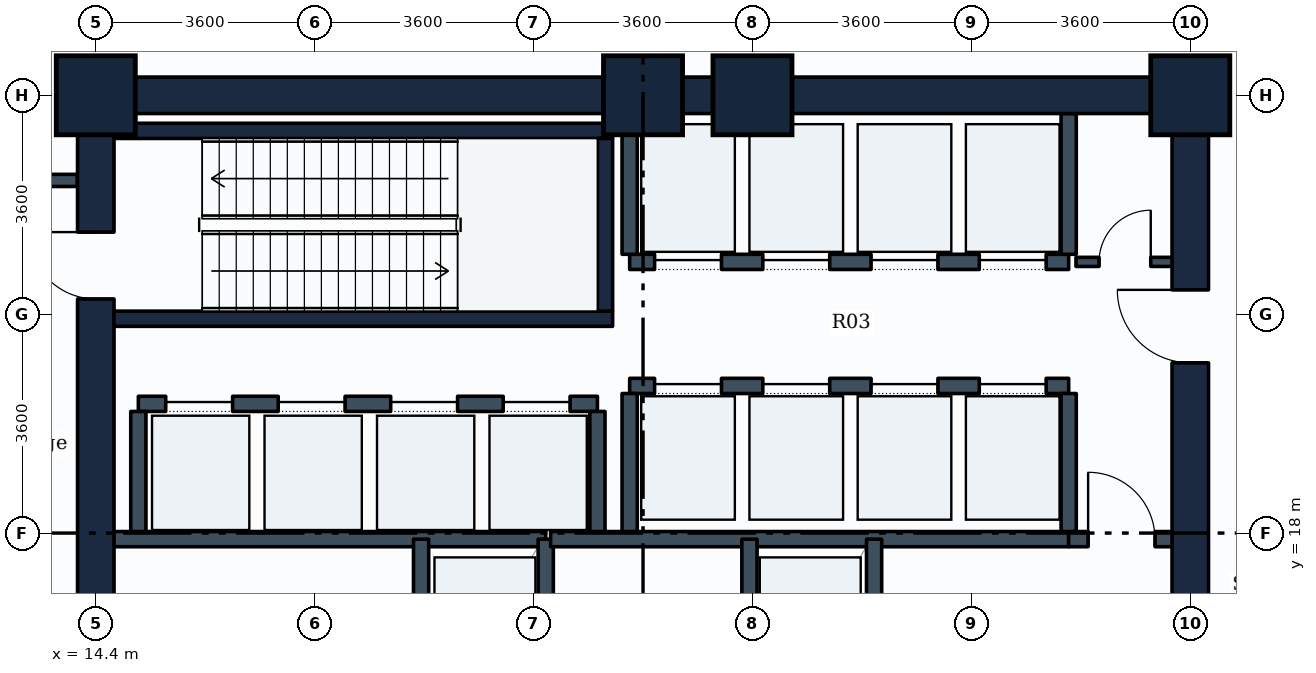
"""IFC4 building model, lengths in metres.
Left out: names, types, materials, properties, quantities, classifications, styles, units other than length and angle.
Written with IfcOpenShell. Run it as: python <this file> out.ifc"""

import sys

from ifc_helpers import new_model, si_unit, direction, frame, frame_2d, origin, origin_2d, place, context, subcontext, project, spatial, rectangle, extrude, element, fill, save


model = new_model("IFC4")
c1 = context("Model", 3, precision=1e-05, world=origin(), true_north=direction((0.0, 1.0)))
c2 = subcontext(c1, "Body", "Model", "MODEL_VIEW")
j1 = project(units=[si_unit("LENGTHUNIT", "METRE"), si_unit("PLANEANGLEUNIT", "RADIAN")], contexts=[c1])
p1 = place(None, origin())
s1 = spatial("IfcSite", under=j1, at=p1, CompositionType="ELEMENT")
p2 = place(p1, origin())
s2 = spatial("IfcBuilding", under=s1, at=p2, CompositionType="ELEMENT")
p3 = place(p2, origin())
s3 = spatial("IfcBuildingStorey", under=s2, at=p3, CompositionType="ELEMENT", Elevation=0.0)
for number, where, z_axis, x_axis in (
    (1, (14.4, 25.2, 0.0), (0.0, 0.0, 1.0), (1.0, 0.0, 0.0)),
    (2, (23.4, 25.2, 0.0), (0.0, 0.0, 1.0), (1.0, 0.0, 0.0)),
    (3, (25.2, 25.2, 0.0), (0.0, 0.0, 1.0), (1.0, 0.0, 0.0)),
    (4, (32.4, 25.2, 0.0), (0.0, 0.0, 1.0), (1.0, 0.0, 0.0)),
):
    element("IfcColumn", number, at=place(p3, frame(where, z_axis=z_axis, x_axis=x_axis)), inside=s3, PredefinedType="COLUMN", context=c2, shape_type="SweptSolid", body=[
        extrude(rectangle(XDim=1.3, YDim=1.3, at=origin_2d()), origin(), (0.0, 0.0, 1.0), 5.4),
    ])
p4 = place(p3, frame((14.4, 25.2, 0.0), z_axis=(0.0, 0.0, 1.0), x_axis=(1.0, 0.0, 0.0)))
e5 = element("IfcWall", 5, at=p4, inside=s3, PredefinedType="SHEAR", context=c2, shape_type="SweptSolid", body=[
    extrude(rectangle(XDim=18.0, YDim=0.6, at=frame_2d((9.0, 0.0))), origin(), (0.0, 0.0, 1.0), 5.1),
])
p5 = place(p3, frame((14.4, 10.8, 0.0), z_axis=(0.0, 0.0, 1.0), x_axis=(0.0, 1.0, 0.0)))
e6 = element("IfcWall", 6, at=p5, inside=s3, PredefinedType="SHEAR", context=c2, shape_type="SweptSolid", body=[
    extrude(rectangle(XDim=14.4, YDim=0.6, at=frame_2d((7.2, 0.0))), origin(), (0.0, 0.0, 1.0), 5.1),
])
p6 = place(p5, frame((11.05, 0.0, 0.0)))
e7 = element("IfcOpeningElement", 7, at=p6, cuts=e6, PredefinedType="OPENING", context=c2, shape_type="SweptSolid", body=[
    extrude(rectangle(XDim=1.1, YDim=2.1, at=frame_2d((0.55, 1.05))), frame((0.0, 0.31, 0.0), z_axis=(0.0, -1.0, 0.0), x_axis=(1.0, 0.0, 0.0)), (0.0, 0.0, 1.0), 0.62),
])
p7 = place(p5, frame((4.9, 0.0, 0.0)))
e8 = element("IfcOpeningElement", 8, at=p7, cuts=e6, PredefinedType="OPENING", context=c2, shape_type="SweptSolid", body=[
    extrude(rectangle(XDim=1.2, YDim=2.1, at=frame_2d((0.6, 1.05))), frame((0.0, 0.31, 0.0), z_axis=(0.0, -1.0, 0.0), x_axis=(1.0, 0.0, 0.0)), (0.0, 0.0, 1.0), 0.62),
])
p8 = place(p3, frame((32.4, 10.8, 0.0), z_axis=(0.0, 0.0, 1.0), x_axis=(0.0, 1.0, 0.0)))
e9 = element("IfcWall", 9, at=p8, inside=s3, PredefinedType="SHEAR", context=c2, shape_type="SweptSolid", body=[
    extrude(rectangle(XDim=14.4, YDim=0.6, at=frame_2d((7.2, 0.0))), origin(), (0.0, 0.0, 1.0), 5.1),
])
p9 = place(p8, frame((4.35, 0.0, 0.0)))
e10 = element("IfcOpeningElement", 10, at=p9, cuts=e9, PredefinedType="OPENING", context=c2, shape_type="SweptSolid", body=[
    extrude(rectangle(XDim=1.2, YDim=2.1, at=frame_2d((0.6, 1.05))), frame((0.0, 0.31, 0.0), z_axis=(0.0, -1.0, 0.0), x_axis=(1.0, 0.0, 0.0)), (0.0, 0.0, 1.0), 0.62),
])
p10 = place(p8, frame((10.0, 0.0, 0.0)))
e11 = element("IfcOpeningElement", 11, at=p10, cuts=e9, PredefinedType="OPENING", context=c2, shape_type="SweptSolid", body=[
    extrude(rectangle(XDim=1.2, YDim=2.1, at=frame_2d((0.6, 1.05))), frame((0.0, 0.31, 0.0), z_axis=(0.0, -1.0, 0.0), x_axis=(1.0, 0.0, 0.0)), (0.0, 0.0, 1.0), 0.62),
])
for number, where, z_axis, x_axis in (
    (12, (14.7, 21.525, 0.0), (0.0, 0.0, 1.0), (1.0, 0.0, 0.0)),
    (13, (14.7, 24.615, 0.0), (0.0, 0.0, 1.0), (1.0, 0.0, 0.0)),
):
    element("IfcWall", number, at=place(p3, frame(where, z_axis=z_axis, x_axis=x_axis)), inside=s3, PredefinedType="SHEAR", context=c2, shape_type="SweptSolid", body=[
        extrude(rectangle(XDim=8.2, YDim=0.25, at=frame_2d((4.1, 0.0))), origin(), (0.0, 0.0, 1.0), 5.1),
    ])
p11 = place(p3, frame((22.775, 21.65, 0.0), z_axis=(0.0, 0.0, 1.0), x_axis=(0.0, 1.0, 0.0)))
e14 = element("IfcWall", 14, at=p11, inside=s3, PredefinedType="SHEAR", context=c2, shape_type="SweptSolid", body=[
    extrude(rectangle(XDim=2.84, YDim=0.25, at=frame_2d((1.42, 0.0))), origin(), (0.0, 0.0, 1.0), 5.1),
])
p12 = place(p3, frame((14.65, 17.9, 0.0), z_axis=(0.0, 0.0, 1.0), x_axis=(1.0, 0.0, 0.0)))
e15 = element("IfcWall", 15, at=p12, inside=s3, PredefinedType="PARTITIONING", context=c2, shape_type="SweptSolid", body=[
    extrude(rectangle(XDim=7.15, YDim=0.25, at=frame_2d((3.575, 0.0))), origin(), (0.0, 0.0, 1.0), 5.085),
])
p13 = place(p3, frame((19.75, 14.84, 0.0), z_axis=(0.0, 0.0, 1.0), x_axis=(0.0, 1.0, 0.0)))
e16 = element("IfcWall", 16, at=p13, inside=s3, PredefinedType="PARTITIONING", context=c2, shape_type="SweptSolid", body=[
    extrude(rectangle(XDim=3.06, YDim=0.25, at=frame_2d((1.53, 0.0))), origin(), (0.0, 0.0, 1.0), 5.085),
])
p14 = place(p13, frame((0.98, 0.0, 0.0)))
e17 = element("IfcOpeningElement", 17, at=p14, cuts=e16, PredefinedType="OPENING", context=c2, shape_type="SweptSolid", body=[
    extrude(rectangle(XDim=1.1, YDim=2.1, at=frame_2d((0.55, 1.05))), frame((0.0, 0.135, 0.0), z_axis=(0.0, -1.0, 0.0), x_axis=(1.0, 0.0, 0.0)), (0.0, 0.0, 1.0), 0.27),
])
p15 = place(p3, frame((21.8, 14.84, 0.0), z_axis=(0.0, 0.0, 1.0), x_axis=(0.0, 1.0, 0.0)))
e18 = element("IfcWall", 18, at=p15, inside=s3, PredefinedType="PARTITIONING", context=c2, shape_type="SweptSolid", body=[
    extrude(rectangle(XDim=3.06, YDim=0.25, at=frame_2d((1.53, 0.0))), origin(), (0.0, 0.0, 1.0), 5.085),
])
p16 = place(p3, frame((21.88, 17.9, 0.0), z_axis=(0.0, 0.0, 1.0), x_axis=(1.0, 0.0, 0.0)))
e19 = element("IfcWall", 19, at=p16, inside=s3, PredefinedType="PARTITIONING", context=c2, shape_type="SweptSolid", body=[
    extrude(rectangle(XDim=8.52, YDim=0.25, at=frame_2d((4.26, 0.0))), origin(), (0.0, 0.0, 1.0), 5.085),
])
p17 = place(p3, frame((30.4, 17.9, 0.0), z_axis=(0.0, 0.0, 1.0), x_axis=(1.0, 0.0, 0.0)))
e20 = element("IfcWall", 20, at=p17, inside=s3, PredefinedType="PARTITIONING", context=c2, shape_type="SweptSolid", body=[
    extrude(rectangle(XDim=1.75, YDim=0.25, at=frame_2d((0.875, 0.0))), origin(), (0.0, 0.0, 1.0), 5.085),
])
p18 = place(p17, frame((0.32, 0.0, 0.0)))
e21 = element("IfcOpeningElement", 21, at=p18, cuts=e20, PredefinedType="OPENING", context=c2, shape_type="SweptSolid", body=[
    extrude(rectangle(XDim=1.1, YDim=2.1, at=frame_2d((0.55, 1.05))), frame((0.0, 0.135, 0.0), z_axis=(0.0, -1.0, 0.0), x_axis=(1.0, 0.0, 0.0)), (0.0, 0.0, 1.0), 0.27),
])
p19 = place(p3, frame((25.15, 14.84, 0.0), z_axis=(0.0, 0.0, 1.0), x_axis=(0.0, 1.0, 0.0)))
e22 = element("IfcWall", 22, at=p19, inside=s3, PredefinedType="PARTITIONING", context=c2, shape_type="SweptSolid", body=[
    extrude(rectangle(XDim=3.06, YDim=0.25, at=frame_2d((1.53, 0.0))), origin(), (0.0, 0.0, 1.0), 5.085),
])
p20 = place(p3, frame((27.2, 14.84, 0.0), z_axis=(0.0, 0.0, 1.0), x_axis=(0.0, 1.0, 0.0)))
e23 = element("IfcWall", 23, at=p20, inside=s3, PredefinedType="PARTITIONING", context=c2, shape_type="SweptSolid", body=[
    extrude(rectangle(XDim=3.06, YDim=0.25, at=frame_2d((1.53, 0.0))), origin(), (0.0, 0.0, 1.0), 5.085),
])
p21 = place(p20, frame((0.98, 0.0, 0.0)))
e24 = element("IfcOpeningElement", 24, at=p21, cuts=e23, PredefinedType="OPENING", context=c2, shape_type="SweptSolid", body=[
    extrude(rectangle(XDim=1.1, YDim=2.1, at=frame_2d((0.55, 1.05))), frame((0.0, 0.135, 0.0), z_axis=(0.0, -1.0, 0.0), x_axis=(1.0, 0.0, 0.0)), (0.0, 0.0, 1.0), 0.27),
])
p22 = place(p3, frame((15.1, 20.125, 0.0), z_axis=(0.0, 0.0, 1.0), x_axis=(1.0, 0.0, 0.0)))
e25 = element("IfcWall", 25, at=p22, inside=s3, PredefinedType="PARTITIONING", context=c2, shape_type="SweptSolid", body=[
    extrude(rectangle(XDim=7.55, YDim=0.25, at=frame_2d((3.775, 0.0))), origin(), (0.0, 0.0, 1.0), 5.085),
])
p23 = place(p22, frame((0.45, 0.0, 0.0)))
e26 = element("IfcOpeningElement", 26, at=p23, cuts=e25, PredefinedType="OPENING", context=c2, shape_type="SweptSolid", body=[
    extrude(rectangle(XDim=1.1, YDim=2.1, at=frame_2d((0.55, 1.05))), frame((0.0, 0.135, 0.0), z_axis=(0.0, -1.0, 0.0), x_axis=(1.0, 0.0, 0.0)), (0.0, 0.0, 1.0), 0.27),
])
p24 = place(p22, frame((2.3, 0.0, 0.0)))
e27 = element("IfcOpeningElement", 27, at=p24, cuts=e25, PredefinedType="OPENING", context=c2, shape_type="SweptSolid", body=[
    extrude(rectangle(XDim=1.1, YDim=2.1, at=frame_2d((0.55, 1.05))), frame((0.0, 0.135, 0.0), z_axis=(0.0, -1.0, 0.0), x_axis=(1.0, 0.0, 0.0)), (0.0, 0.0, 1.0), 0.27),
])
p25 = place(p22, frame((4.15, 0.0, 0.0)))
e28 = element("IfcOpeningElement", 28, at=p25, cuts=e25, PredefinedType="OPENING", context=c2, shape_type="SweptSolid", body=[
    extrude(rectangle(XDim=1.1, YDim=2.1, at=frame_2d((0.55, 1.05))), frame((0.0, 0.135, 0.0), z_axis=(0.0, -1.0, 0.0), x_axis=(1.0, 0.0, 0.0)), (0.0, 0.0, 1.0), 0.27),
])
p26 = place(p22, frame((6.0, 0.0, 0.0)))
e29 = element("IfcOpeningElement", 29, at=p26, cuts=e25, PredefinedType="OPENING", context=c2, shape_type="SweptSolid", body=[
    extrude(rectangle(XDim=1.1, YDim=2.1, at=frame_2d((0.55, 1.05))), frame((0.0, 0.135, 0.0), z_axis=(0.0, -1.0, 0.0), x_axis=(1.0, 0.0, 0.0)), (0.0, 0.0, 1.0), 0.27),
])
for number, where, z_axis, x_axis in (
    (30, (15.1, 18.025, 0.0), (0.0, 0.0, 1.0), (0.0, 1.0, 0.0)),
    (31, (22.65, 18.025, 0.0), (0.0, 0.0, 1.0), (0.0, 1.0, 0.0)),
):
    element("IfcWall", number, at=place(p3, frame(where, z_axis=z_axis, x_axis=x_axis)), inside=s3, PredefinedType="PARTITIONING", context=c2, shape_type="SweptSolid", body=[
        extrude(rectangle(XDim=1.975, YDim=0.25, at=frame_2d((0.988, 0.0))), origin(), (0.0, 0.0, 1.0), 5.085),
    ])
p27 = place(p3, frame((23.18, 20.42, 0.0), z_axis=(0.0, 0.0, 1.0), x_axis=(1.0, 0.0, 0.0)))
e32 = element("IfcWall", 32, at=p27, inside=s3, PredefinedType="PARTITIONING", context=c2, shape_type="SweptSolid", body=[
    extrude(rectangle(XDim=7.22, YDim=0.25, at=frame_2d((3.61, 0.0))), origin(), (0.0, 0.0, 1.0), 5.085),
])
p28 = place(p27, frame((0.41, 0.0, 0.0)))
e33 = element("IfcOpeningElement", 33, at=p28, cuts=e32, PredefinedType="OPENING", context=c2, shape_type="SweptSolid", body=[
    extrude(rectangle(XDim=1.1, YDim=2.1, at=frame_2d((0.55, 1.05))), frame((0.0, 0.135, 0.0), z_axis=(0.0, -1.0, 0.0), x_axis=(1.0, 0.0, 0.0)), (0.0, 0.0, 1.0), 0.27),
])
p29 = place(p27, frame((2.19, 0.0, 0.0)))
e34 = element("IfcOpeningElement", 34, at=p29, cuts=e32, PredefinedType="OPENING", context=c2, shape_type="SweptSolid", body=[
    extrude(rectangle(XDim=1.1, YDim=2.1, at=frame_2d((0.55, 1.05))), frame((0.0, 0.135, 0.0), z_axis=(0.0, -1.0, 0.0), x_axis=(1.0, 0.0, 0.0)), (0.0, 0.0, 1.0), 0.27),
])
p30 = place(p27, frame((3.97, 0.0, 0.0)))
e35 = element("IfcOpeningElement", 35, at=p30, cuts=e32, PredefinedType="OPENING", context=c2, shape_type="SweptSolid", body=[
    extrude(rectangle(XDim=1.1, YDim=2.1, at=frame_2d((0.55, 1.05))), frame((0.0, 0.135, 0.0), z_axis=(0.0, -1.0, 0.0), x_axis=(1.0, 0.0, 0.0)), (0.0, 0.0, 1.0), 0.27),
])
p31 = place(p27, frame((5.75, 0.0, 0.0)))
e36 = element("IfcOpeningElement", 36, at=p31, cuts=e32, PredefinedType="OPENING", context=c2, shape_type="SweptSolid", body=[
    extrude(rectangle(XDim=1.1, YDim=2.1, at=frame_2d((0.55, 1.05))), frame((0.0, 0.135, 0.0), z_axis=(0.0, -1.0, 0.0), x_axis=(1.0, 0.0, 0.0)), (0.0, 0.0, 1.0), 0.27),
])
for number, where, z_axis, x_axis in (
    (37, (23.18, 18.025, 0.0), (0.0, 0.0, 1.0), (0.0, 1.0, 0.0)),
    (38, (30.4, 18.025, 0.0), (0.0, 0.0, 1.0), (0.0, 1.0, 0.0)),
):
    element("IfcWall", number, at=place(p3, frame(where, z_axis=z_axis, x_axis=x_axis)), inside=s3, PredefinedType="PARTITIONING", context=c2, shape_type="SweptSolid", body=[
        extrude(rectangle(XDim=2.27, YDim=0.25, at=frame_2d((1.135, 0.0))), origin(), (0.0, 0.0, 1.0), 5.085),
    ])
p32 = place(p3, frame((23.18, 22.46, 0.0), z_axis=(0.0, 0.0, 1.0), x_axis=(1.0, 0.0, 0.0)))
e39 = element("IfcWall", 39, at=p32, inside=s3, PredefinedType="PARTITIONING", context=c2, shape_type="SweptSolid", body=[
    extrude(rectangle(XDim=7.22, YDim=0.25, at=frame_2d((3.61, 0.0))), origin(), (0.0, 0.0, 1.0), 5.085),
])
p33 = place(p32, frame((0.41, 0.0, 0.0)))
e40 = element("IfcOpeningElement", 40, at=p33, cuts=e39, PredefinedType="OPENING", context=c2, shape_type="SweptSolid", body=[
    extrude(rectangle(XDim=1.1, YDim=2.1, at=frame_2d((0.55, 1.05))), frame((0.0, 0.135, 0.0), z_axis=(0.0, -1.0, 0.0), x_axis=(1.0, 0.0, 0.0)), (0.0, 0.0, 1.0), 0.27),
])
p34 = place(p32, frame((2.19, 0.0, 0.0)))
e41 = element("IfcOpeningElement", 41, at=p34, cuts=e39, PredefinedType="OPENING", context=c2, shape_type="SweptSolid", body=[
    extrude(rectangle(XDim=1.1, YDim=2.1, at=frame_2d((0.55, 1.05))), frame((0.0, 0.135, 0.0), z_axis=(0.0, -1.0, 0.0), x_axis=(1.0, 0.0, 0.0)), (0.0, 0.0, 1.0), 0.27),
])
p35 = place(p32, frame((3.97, 0.0, 0.0)))
e42 = element("IfcOpeningElement", 42, at=p35, cuts=e39, PredefinedType="OPENING", context=c2, shape_type="SweptSolid", body=[
    extrude(rectangle(XDim=1.1, YDim=2.1, at=frame_2d((0.55, 1.05))), frame((0.0, 0.135, 0.0), z_axis=(0.0, -1.0, 0.0), x_axis=(1.0, 0.0, 0.0)), (0.0, 0.0, 1.0), 0.27),
])
p36 = place(p32, frame((5.75, 0.0, 0.0)))
e43 = element("IfcOpeningElement", 43, at=p36, cuts=e39, PredefinedType="OPENING", context=c2, shape_type="SweptSolid", body=[
    extrude(rectangle(XDim=1.1, YDim=2.1, at=frame_2d((0.55, 1.05))), frame((0.0, 0.135, 0.0), z_axis=(0.0, -1.0, 0.0), x_axis=(1.0, 0.0, 0.0)), (0.0, 0.0, 1.0), 0.27),
])
for number, where, z_axis, x_axis in (
    (44, (23.18, 22.585, 0.0), (0.0, 0.0, 1.0), (0.0, 1.0, 0.0)),
    (45, (30.4, 22.585, 0.0), (0.0, 0.0, 1.0), (0.0, 1.0, 0.0)),
):
    element("IfcWall", number, at=place(p3, frame(where, z_axis=z_axis, x_axis=x_axis)), inside=s3, PredefinedType="PARTITIONING", context=c2, shape_type="SweptSolid", body=[
        extrude(rectangle(XDim=2.315, YDim=0.25, at=frame_2d((1.157, 0.0))), origin(), (0.0, 0.0, 1.0), 5.085),
    ])
p37 = place(p3, frame((30.52, 22.46, 0.0), z_axis=(0.0, 0.0, 1.0), x_axis=(1.0, 0.0, 0.0)))
e46 = element("IfcWall", 46, at=p37, inside=s3, PredefinedType="PARTITIONING", context=c2, shape_type="SweptSolid", body=[
    extrude(rectangle(XDim=1.63, YDim=0.15, at=frame_2d((0.815, 0.0))), origin(), (0.0, 0.0, 1.0), 5.085),
])
p38 = place(p37, frame((0.38, 0.0, 0.0)))
e47 = element("IfcOpeningElement", 47, at=p38, cuts=e46, PredefinedType="OPENING", context=c2, shape_type="SweptSolid", body=[
    extrude(rectangle(XDim=0.85, YDim=2.1, at=frame_2d((0.425, 1.05))), frame((0.0, 0.085, 0.0), z_axis=(0.0, -1.0, 0.0), x_axis=(1.0, 0.0, 0.0)), (0.0, 0.0, 1.0), 0.17),
])
p39 = place(p3, frame((12.004, 23.8, 0.0), z_axis=(0.0, 0.0, 1.0), x_axis=(1.0, 0.0, 0.0)))
e48 = element("IfcWall", 48, at=p39, inside=s3, PredefinedType="PARTITIONING", context=c2, shape_type="SweptSolid", body=[
    extrude(rectangle(XDim=2.092, YDim=0.2, at=frame_2d((1.046, 0.0))), origin(), (0.0, 0.0, 1.0), 5.085),
])
p40 = place(p6, origin())
e49 = element("IfcDoor", 49, at=p40, inside=s3, OperationType="SINGLE_SWING_RIGHT", PredefinedType="DOOR", context=c2, shape_type="SweptSolid", body=[
    extrude(rectangle(XDim=1.1, YDim=2.1, at=frame_2d((0.55, 1.05))), frame((0.0, 0.025, 0.0), z_axis=(0.0, -1.0, 0.0), x_axis=(1.0, 0.0, 0.0)), (0.0, 0.0, 1.0), 0.05),
])
fill(e7, e49)
p41 = place(p18, origin())
e50 = element("IfcDoor", 50, at=p41, inside=s3, OperationType="SINGLE_SWING_LEFT", PredefinedType="DOOR", context=c2, shape_type="SweptSolid", body=[
    extrude(rectangle(XDim=1.1, YDim=2.1, at=frame_2d((0.55, 1.05))), frame((0.0, 0.025, 0.0), z_axis=(0.0, -1.0, 0.0), x_axis=(1.0, 0.0, 0.0)), (0.0, 0.0, 1.0), 0.05),
])
fill(e21, e50)
p42 = place(p23, origin())
e51 = element("IfcDoor", 51, at=p42, inside=s3, OperationType="SLIDING_TO_LEFT", PredefinedType="DOOR", context=c2, shape_type="SweptSolid", body=[
    extrude(rectangle(XDim=1.1, YDim=2.1, at=frame_2d((0.55, 1.05))), frame((0.0, 0.025, 0.0), z_axis=(0.0, -1.0, 0.0), x_axis=(1.0, 0.0, 0.0)), (0.0, 0.0, 1.0), 0.05),
])
fill(e26, e51)
p43 = place(p24, origin())
e52 = element("IfcDoor", 52, at=p43, inside=s3, OperationType="SLIDING_TO_LEFT", PredefinedType="DOOR", context=c2, shape_type="SweptSolid", body=[
    extrude(rectangle(XDim=1.1, YDim=2.1, at=frame_2d((0.55, 1.05))), frame((0.0, 0.025, 0.0), z_axis=(0.0, -1.0, 0.0), x_axis=(1.0, 0.0, 0.0)), (0.0, 0.0, 1.0), 0.05),
])
fill(e27, e52)
p44 = place(p25, origin())
e53 = element("IfcDoor", 53, at=p44, inside=s3, OperationType="SLIDING_TO_LEFT", PredefinedType="DOOR", context=c2, shape_type="SweptSolid", body=[
    extrude(rectangle(XDim=1.1, YDim=2.1, at=frame_2d((0.55, 1.05))), frame((0.0, 0.025, 0.0), z_axis=(0.0, -1.0, 0.0), x_axis=(1.0, 0.0, 0.0)), (0.0, 0.0, 1.0), 0.05),
])
fill(e28, e53)
p45 = place(p26, origin())
e54 = element("IfcDoor", 54, at=p45, inside=s3, OperationType="SLIDING_TO_LEFT", PredefinedType="DOOR", context=c2, shape_type="SweptSolid", body=[
    extrude(rectangle(XDim=1.1, YDim=2.1, at=frame_2d((0.55, 1.05))), frame((0.0, 0.025, 0.0), z_axis=(0.0, -1.0, 0.0), x_axis=(1.0, 0.0, 0.0)), (0.0, 0.0, 1.0), 0.05),
])
fill(e29, e54)
p46 = place(p28, origin())
e55 = element("IfcDoor", 55, at=p46, inside=s3, OperationType="SLIDING_TO_LEFT", PredefinedType="DOOR", context=c2, shape_type="SweptSolid", body=[
    extrude(rectangle(XDim=1.1, YDim=2.1, at=frame_2d((0.55, 1.05))), frame((0.0, 0.025, 0.0), z_axis=(0.0, -1.0, 0.0), x_axis=(1.0, 0.0, 0.0)), (0.0, 0.0, 1.0), 0.05),
])
fill(e33, e55)
p47 = place(p29, origin())
e56 = element("IfcDoor", 56, at=p47, inside=s3, OperationType="SLIDING_TO_LEFT", PredefinedType="DOOR", context=c2, shape_type="SweptSolid", body=[
    extrude(rectangle(XDim=1.1, YDim=2.1, at=frame_2d((0.55, 1.05))), frame((0.0, 0.025, 0.0), z_axis=(0.0, -1.0, 0.0), x_axis=(1.0, 0.0, 0.0)), (0.0, 0.0, 1.0), 0.05),
])
fill(e34, e56)
p48 = place(p30, origin())
e57 = element("IfcDoor", 57, at=p48, inside=s3, OperationType="SLIDING_TO_LEFT", PredefinedType="DOOR", context=c2, shape_type="SweptSolid", body=[
    extrude(rectangle(XDim=1.1, YDim=2.1, at=frame_2d((0.55, 1.05))), frame((0.0, 0.025, 0.0), z_axis=(0.0, -1.0, 0.0), x_axis=(1.0, 0.0, 0.0)), (0.0, 0.0, 1.0), 0.05),
])
fill(e35, e57)
p49 = place(p31, origin())
e58 = element("IfcDoor", 58, at=p49, inside=s3, OperationType="SLIDING_TO_LEFT", PredefinedType="DOOR", context=c2, shape_type="SweptSolid", body=[
    extrude(rectangle(XDim=1.1, YDim=2.1, at=frame_2d((0.55, 1.05))), frame((0.0, 0.025, 0.0), z_axis=(0.0, -1.0, 0.0), x_axis=(1.0, 0.0, 0.0)), (0.0, 0.0, 1.0), 0.05),
])
fill(e36, e58)
p50 = place(p33, origin())
e59 = element("IfcDoor", 59, at=p50, inside=s3, OperationType="SLIDING_TO_LEFT", PredefinedType="DOOR", context=c2, shape_type="SweptSolid", body=[
    extrude(rectangle(XDim=1.1, YDim=2.1, at=frame_2d((0.55, 1.05))), frame((0.0, 0.025, 0.0), z_axis=(0.0, -1.0, 0.0), x_axis=(1.0, 0.0, 0.0)), (0.0, 0.0, 1.0), 0.05),
])
fill(e40, e59)
p51 = place(p34, origin())
e60 = element("IfcDoor", 60, at=p51, inside=s3, OperationType="SLIDING_TO_LEFT", PredefinedType="DOOR", context=c2, shape_type="SweptSolid", body=[
    extrude(rectangle(XDim=1.1, YDim=2.1, at=frame_2d((0.55, 1.05))), frame((0.0, 0.025, 0.0), z_axis=(0.0, -1.0, 0.0), x_axis=(1.0, 0.0, 0.0)), (0.0, 0.0, 1.0), 0.05),
])
fill(e41, e60)
p52 = place(p35, origin())
e61 = element("IfcDoor", 61, at=p52, inside=s3, OperationType="SLIDING_TO_LEFT", PredefinedType="DOOR", context=c2, shape_type="SweptSolid", body=[
    extrude(rectangle(XDim=1.1, YDim=2.1, at=frame_2d((0.55, 1.05))), frame((0.0, 0.025, 0.0), z_axis=(0.0, -1.0, 0.0), x_axis=(1.0, 0.0, 0.0)), (0.0, 0.0, 1.0), 0.05),
])
fill(e42, e61)
p53 = place(p36, origin())
e62 = element("IfcDoor", 62, at=p53, inside=s3, OperationType="SLIDING_TO_LEFT", PredefinedType="DOOR", context=c2, shape_type="SweptSolid", body=[
    extrude(rectangle(XDim=1.1, YDim=2.1, at=frame_2d((0.55, 1.05))), frame((0.0, 0.025, 0.0), z_axis=(0.0, -1.0, 0.0), x_axis=(1.0, 0.0, 0.0)), (0.0, 0.0, 1.0), 0.05),
])
fill(e43, e62)
p54 = place(p10, origin())
e63 = element("IfcDoor", 63, at=p54, inside=s3, OperationType="SINGLE_SWING_RIGHT", PredefinedType="DOOR", context=c2, shape_type="SweptSolid", body=[
    extrude(rectangle(XDim=1.2, YDim=2.1, at=frame_2d((0.6, 1.05))), frame((0.0, 0.025, 0.0), z_axis=(0.0, -1.0, 0.0), x_axis=(1.0, 0.0, 0.0)), (0.0, 0.0, 1.0), 0.05),
])
fill(e11, e63)
p55 = place(p38, origin())
e64 = element("IfcDoor", 64, at=p55, inside=s3, OperationType="SINGLE_SWING_RIGHT", PredefinedType="DOOR", context=c2, shape_type="SweptSolid", body=[
    extrude(rectangle(XDim=0.85, YDim=2.1, at=frame_2d((0.425, 1.05))), frame((0.0, 0.025, 0.0), z_axis=(0.0, -1.0, 0.0), x_axis=(1.0, 0.0, 0.0)), (0.0, 0.0, 1.0), 0.05),
])
fill(e47, e64)
save(model, sys.argv[1])
